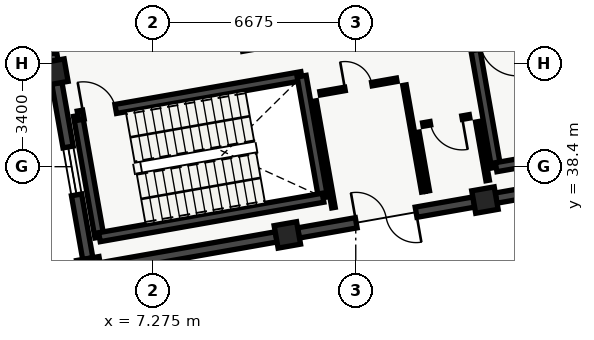
"""IFC4 building model, lengths in metres.
Left out: names, types, materials, properties, quantities, classifications, styles, units other than length and angle.
Written with IfcOpenShell. Run it as: python <this file> out.ifc"""

import sys

from ifc_helpers import new_model, si_unit, direction, frame, frame_2d, origin, origin_2d, place, context, subcontext, project, spatial, rectangle, extrude, element, fill, save


model = new_model("IFC4")
c1 = context("Model", 3, precision=1e-05, world=origin(), true_north=direction((0.0, 1.0)))
c2 = subcontext(c1, "Body", "Model", "MODEL_VIEW")
j1 = project(units=[si_unit("LENGTHUNIT", "METRE"), si_unit("PLANEANGLEUNIT", "RADIAN")], contexts=[c1])
p1 = place(None, origin())
s1 = spatial("IfcSite", under=j1, at=p1, CompositionType="ELEMENT")
p2 = place(p1, origin())
s2 = spatial("IfcBuilding", under=s1, at=p2, CompositionType="ELEMENT")
p3 = place(p2, origin())
s3 = spatial("IfcBuildingStorey", under=s2, at=p3, CompositionType="ELEMENT", Elevation=0.0)
for number, where, z_axis, x_axis in (
    (1, (5.2, 35.01, 0.0), (0.0, 0.0, 1.0), (0.985, 0.174, 0.0)),
    (2, (4.054, 41.51, 0.0), (0.0, 0.0, 1.0), (0.985, 0.174, 0.0)),
    (3, (11.7, 36.156, 0.0), (0.0, 0.0, 1.0), (0.985, 0.174, 0.0)),
    (4, (18.199, 37.302, 0.0), (0.0, 0.0, 1.0), (0.985, 0.174, 0.0)),
):
    element("IfcColumn", number, at=place(p3, frame(where, z_axis=z_axis, x_axis=x_axis)), inside=s3, PredefinedType="COLUMN", context=c2, shape_type="SweptSolid", body=[
        extrude(rectangle(XDim=0.75, YDim=0.75, at=origin_2d()), origin(), (0.0, 0.0, 1.0), 4.92),
    ])
p4 = place(p3, frame((5.136, 35.374, 0.0), z_axis=(0.0, 0.0, 1.0), x_axis=(-0.1736474839, 0.984807875342, 0.0)))
e5 = element("IfcWall", 5, at=p4, inside=s3, PredefinedType="SOLIDWALL", context=c2, shape_type="SweptSolid", body=[
    extrude(rectangle(XDim=5.86, YDim=0.34, at=frame_2d((2.93, 0.0))), origin(), (0.0, 0.0, 1.0), 4.455),
])
p5 = place(p4, frame((2.13, 0.0, 0.95)))
e6 = element("IfcOpeningElement", 6, at=p5, cuts=e5, PredefinedType="OPENING", context=c2, shape_type="SweptSolid", body=[
    extrude(rectangle(XDim=1.6, YDim=1.4, at=frame_2d((0.8, 0.7))), frame((0.0, 0.17, 0.0), z_axis=(0.0, -1.0, 0.0), x_axis=(1.0, 0.0, 0.0)), (0.0, 0.0, 1.0), 0.34),
])
p6 = place(p3, frame((3.99, 41.874, 0.0), z_axis=(0.0, 0.0, 1.0), x_axis=(-0.1736474839, 0.984807875342, 0.0)))
e7 = element("IfcWall", 7, at=p6, inside=s3, PredefinedType="SOLIDWALL", context=c2, shape_type="SweptSolid", body=[
    extrude(rectangle(XDim=5.86, YDim=0.34, at=frame_2d((2.93, 0.0))), origin(), (0.0, 0.0, 1.0), 4.455),
])
p7 = place(p6, frame((0.25, 0.0, 0.0)))
e8 = element("IfcOpeningElement", 8, at=p7, cuts=e7, PredefinedType="OPENING", context=c2, shape_type="SweptSolid", body=[
    extrude(rectangle(XDim=2.0, YDim=2.25, at=frame_2d((1.0, 1.125))), frame((0.0, 0.17, 0.0), z_axis=(0.0, -1.0, 0.0), x_axis=(1.0, 0.0, 0.0)), (0.0, 0.0, 1.0), 0.34),
])
p8 = place(p3, frame((24.335, 38.384, 0.0), z_axis=(0.0, 0.0, 1.0), x_axis=(-0.984807875342, -0.1736474839, 0.0)))
e9 = element("IfcWall", 9, at=p8, inside=s3, PredefinedType="SOLIDWALL", context=c2, shape_type="SweptSolid", body=[
    extrude(rectangle(XDim=5.86, YDim=0.34, at=frame_2d((2.93, 0.0))), origin(), (0.0, 0.0, 1.0), 4.455),
])
p9 = place(p3, frame((17.835, 37.238, 0.0), z_axis=(0.0, 0.0, 1.0), x_axis=(-0.98480661901, -0.173654608793, 0.0)))
e10 = element("IfcWall", 10, at=p9, inside=s3, PredefinedType="SOLIDWALL", context=c2, shape_type="SweptSolid", body=[
    extrude(rectangle(XDim=5.86, YDim=0.34, at=frame_2d((2.93, 0.0))), origin(), (0.0, 0.0, 1.0), 4.455),
])
p10 = place(p9, frame((1.93, 0.0, 0.0)))
e11 = element("IfcOpeningElement", 11, at=p10, cuts=e10, PredefinedType="OPENING", context=c2, shape_type="SweptSolid", body=[
    extrude(rectangle(XDim=2.0, YDim=2.25, at=frame_2d((1.0, 1.125))), frame((0.0, 0.17, 0.0), z_axis=(0.0, -1.0, 0.0), x_axis=(1.0, 0.0, 0.0)), (0.0, 0.0, 1.0), 0.34),
])
p11 = place(p3, frame((11.335, 36.092, 0.0), z_axis=(0.0, 0.0, 1.0), x_axis=(-0.984807875342, -0.1736474839, 0.0)))
e12 = element("IfcWall", 12, at=p11, inside=s3, PredefinedType="SOLIDWALL", context=c2, shape_type="SweptSolid", body=[
    extrude(rectangle(XDim=5.86, YDim=0.34, at=frame_2d((2.93, 0.0))), origin(), (0.0, 0.0, 1.0), 4.455),
])
p12 = place(p3, frame((5.519, 36.082, 0.0), z_axis=(0.0, 0.0, 1.0), x_axis=(-0.173665267602, 0.984804739443, 0.0)))
e13 = element("IfcWall", 13, at=p12, inside=s3, PredefinedType="SHEAR", context=c2, shape_type="SweptSolid", body=[
    extrude(rectangle(XDim=4.06, YDim=0.3, at=frame_2d((2.03, 0.0))), origin(), (0.0, 0.0, 1.0), 4.88),
])
p13 = place(p3, frame((4.814, 40.08, 0.0), z_axis=(0.0, 0.0, 1.0), x_axis=(0.984802636214, 0.173677193974, 0.0)))
e14 = element("IfcWall", 14, at=p13, inside=s3, PredefinedType="SHEAR", context=c2, shape_type="SweptSolid", body=[
    extrude(rectangle(XDim=7.47, YDim=0.3, at=frame_2d((3.735, 0.0))), origin(), (0.0, 0.0, 1.0), 4.88),
])
p14 = place(p13, frame((0.18, 0.0, 0.0)))
e15 = element("IfcOpeningElement", 15, at=p14, cuts=e14, PredefinedType="OPENING", context=c2, shape_type="SweptSolid", body=[
    extrude(rectangle(XDim=1.08, YDim=2.15, at=frame_2d((0.54, 1.075))), frame((0.0, 0.15, 0.0), z_axis=(0.0, -1.0, 0.0), x_axis=(1.0, 0.0, 0.0)), (0.0, 0.0, 1.0), 0.3),
])
p15 = place(p3, frame((12.17, 41.377, 0.0), z_axis=(0.0, 0.0, 1.0), x_axis=(0.173654983803, -0.984806552883, 0.0)))
e16 = element("IfcWall", 16, at=p15, inside=s3, PredefinedType="SHEAR", context=c2, shape_type="SweptSolid", body=[
    extrude(rectangle(XDim=4.06, YDim=0.3, at=frame_2d((2.03, 0.0))), origin(), (0.0, 0.0, 1.0), 4.88),
])
p16 = place(p3, frame((12.875, 37.379, 0.0), z_axis=(0.0, 0.0, 1.0), x_axis=(-0.984808225754, -0.173645496596, 0.0)))
e17 = element("IfcWall", 17, at=p16, inside=s3, PredefinedType="SHEAR", context=c2, shape_type="SweptSolid", body=[
    extrude(rectangle(XDim=7.47, YDim=0.3, at=frame_2d((3.735, 0.0))), origin(), (0.0, 0.0, 1.0), 4.88),
])
p17 = place(p3, frame((18.567, 38.383, 0.0), z_axis=(0.0, 0.0, 1.0), x_axis=(-0.173606946886, 0.984815022221, 0.0)))
e18 = element("IfcWall", 18, at=p17, inside=s3, PredefinedType="SHEAR", context=c2, shape_type="SweptSolid", body=[
    extrude(rectangle(XDim=4.06, YDim=0.3, at=frame_2d((2.03, 0.0))), origin(), (0.0, 0.0, 1.0), 4.88),
])
p18 = place(p3, frame((25.924, 39.68, 0.0), z_axis=(0.0, 0.0, 1.0), x_axis=(-0.984809211193, -0.173639907711, 0.0)))
e19 = element("IfcWall", 19, at=p18, inside=s3, PredefinedType="SHEAR", context=c2, shape_type="SweptSolid", body=[
    extrude(rectangle(XDim=7.47, YDim=0.3, at=frame_2d((3.735, 0.0))), origin(), (0.0, 0.0, 1.0), 4.88),
])
p19 = place(p3, frame((16.171, 37.574, 0.0), z_axis=(0.0, 0.0, 1.0), x_axis=(-0.173644490041, 0.984808403233, 0.0)))
e20 = element("IfcWall", 20, at=p19, inside=s3, PredefinedType="PARTITIONING", context=c2, shape_type="SweptSolid", body=[
    extrude(rectangle(XDim=3.56, YDim=0.115, at=frame_2d((1.78, 0.0))), origin(), (0.0, 0.0, 1.0), 4.55),
])
p20 = place(p3, frame((15.298, 41.259, 0.0), z_axis=(0.0, 0.0, 1.0), x_axis=(-0.984803714572, -0.17367107924, 0.0)))
e21 = element("IfcWall", 21, at=p20, inside=s3, PredefinedType="PARTITIONING", context=c2, shape_type="SweptSolid", body=[
    extrude(rectangle(XDim=2.56, YDim=0.115, at=frame_2d((1.28, 0.0))), origin(), (0.0, 0.0, 1.0), 4.55),
])
p21 = place(p20, frame((0.83, 0.0, 0.0)))
e22 = element("IfcOpeningElement", 22, at=p21, cuts=e21, PredefinedType="OPENING", context=c2, shape_type="SweptSolid", body=[
    extrude(rectangle(XDim=0.9, YDim=2.1, at=frame_2d((0.45, 1.05))), frame((0.0, 0.058, 0.0), z_axis=(0.0, -1.0, 0.0), x_axis=(1.0, 0.0, 0.0)), (0.0, 0.0, 1.0), 0.115),
])
p22 = place(p3, frame((12.599, 40.559, 0.0), z_axis=(0.0, 0.0, 1.0), x_axis=(0.173644490041, -0.984808403233, 0.0)))
e23 = element("IfcWall", 23, at=p22, inside=s3, PredefinedType="PARTITIONING", context=c2, shape_type="SweptSolid", body=[
    extrude(rectangle(XDim=3.56, YDim=0.115, at=frame_2d((1.78, 0.0))), origin(), (0.0, 0.0, 1.0), 4.55),
])
p23 = place(p3, frame((18.289, 37.948, 0.0), z_axis=(0.0, 0.0, 1.0), x_axis=(-0.173643211285, 0.984808628706, 0.0)))
e24 = element("IfcWall", 24, at=p23, inside=s3, PredefinedType="PARTITIONING", context=c2, shape_type="SweptSolid", body=[
    extrude(rectangle(XDim=1.96, YDim=0.115, at=frame_2d((0.98, 0.0))), origin(), (0.0, 0.0, 1.0), 4.255),
])
p24 = place(p3, frame((17.694, 40.056, 0.0), z_axis=(0.0, 0.0, 1.0), x_axis=(-0.984797734253, -0.173704987291, 0.0)))
e25 = element("IfcWall", 25, at=p24, inside=s3, PredefinedType="PARTITIONING", context=c2, shape_type="SweptSolid", body=[
    extrude(rectangle(XDim=1.56, YDim=0.115, at=frame_2d((0.78, 0.0))), origin(), (0.0, 0.0, 1.0), 4.55),
])
p25 = place(p24, frame((0.25, 0.0, 0.0)))
e26 = element("IfcOpeningElement", 26, at=p25, cuts=e25, PredefinedType="OPENING", context=c2, shape_type="SweptSolid", body=[
    extrude(rectangle(XDim=1.06, YDim=2.12, at=frame_2d((0.53, 1.06))), frame((0.0, 0.058, 0.0), z_axis=(0.0, -1.0, 0.0), x_axis=(1.0, 0.0, 0.0)), (0.0, 0.0, 1.0), 0.115),
])
p26 = place(p3, frame((15.979, 39.53, 0.0), z_axis=(0.0, 0.0, 1.0), x_axis=(0.173643211285, -0.984808628706, 0.0)))
e27 = element("IfcWall", 27, at=p26, inside=s3, PredefinedType="PARTITIONING", context=c2, shape_type="SweptSolid", body=[
    extrude(rectangle(XDim=1.96, YDim=0.115, at=frame_2d((0.98, 0.0))), origin(), (0.0, 0.0, 1.0), 4.55),
])
p27 = place(p5, origin())
e28 = element("IfcWindow", 28, at=p27, inside=s3, PartitioningType="SINGLE_PANEL", PredefinedType="WINDOW", context=c2, shape_type="SweptSolid", body=[
    extrude(rectangle(XDim=1.6, YDim=1.4, at=frame_2d((0.8, 0.7))), frame((0.0, 0.03, 0.0), z_axis=(0.0, -1.0, 0.0), x_axis=(1.0, 0.0, 0.0)), (0.0, 0.0, 1.0), 0.06),
])
fill(e6, e28)
p28 = place(p10, origin())
e29 = element("IfcDoor", 29, at=p28, inside=s3, OperationType="DOUBLE_DOOR_SINGLE_SWING", PredefinedType="DOOR", context=c2, shape_type="SweptSolid", body=[
    extrude(rectangle(XDim=2.0, YDim=2.25, at=frame_2d((1.0, 1.125))), frame((0.0, 0.025, 0.0), z_axis=(0.0, -1.0, 0.0), x_axis=(1.0, 0.0, 0.0)), (0.0, 0.0, 1.0), 0.05),
])
fill(e11, e29)
p29 = place(p14, origin())
e30 = element("IfcDoor", 30, at=p29, inside=s3, OperationType="SINGLE_SWING_LEFT", PredefinedType="DOOR", context=c2, shape_type="SweptSolid", body=[
    extrude(rectangle(XDim=1.08, YDim=2.15, at=frame_2d((0.54, 1.075))), frame((0.0, 0.025, 0.0), z_axis=(0.0, -1.0, 0.0), x_axis=(1.0, 0.0, 0.0)), (0.0, 0.0, 1.0), 0.05),
])
fill(e15, e30)
p30 = place(p21, origin())
e31 = element("IfcDoor", 31, at=p30, inside=s3, OperationType="SINGLE_SWING_RIGHT", PredefinedType="DOOR", context=c2, shape_type="SweptSolid", body=[
    extrude(rectangle(XDim=0.9, YDim=2.1, at=frame_2d((0.45, 1.05))), frame((0.0, 0.025, 0.0), z_axis=(0.0, -1.0, 0.0), x_axis=(1.0, 0.0, 0.0)), (0.0, 0.0, 1.0), 0.05),
])
fill(e22, e31)
p31 = place(p25, origin())
e32 = element("IfcDoor", 32, at=p31, inside=s3, OperationType="SINGLE_SWING_LEFT", PredefinedType="DOOR", context=c2, shape_type="SweptSolid", body=[
    extrude(rectangle(XDim=1.06, YDim=2.12, at=frame_2d((0.53, 1.06))), frame((0.0, 0.025, 0.0), z_axis=(0.0, -1.0, 0.0), x_axis=(1.0, 0.0, 0.0)), (0.0, 0.0, 1.0), 0.05),
])
fill(e26, e32)
save(model, sys.argv[1])
